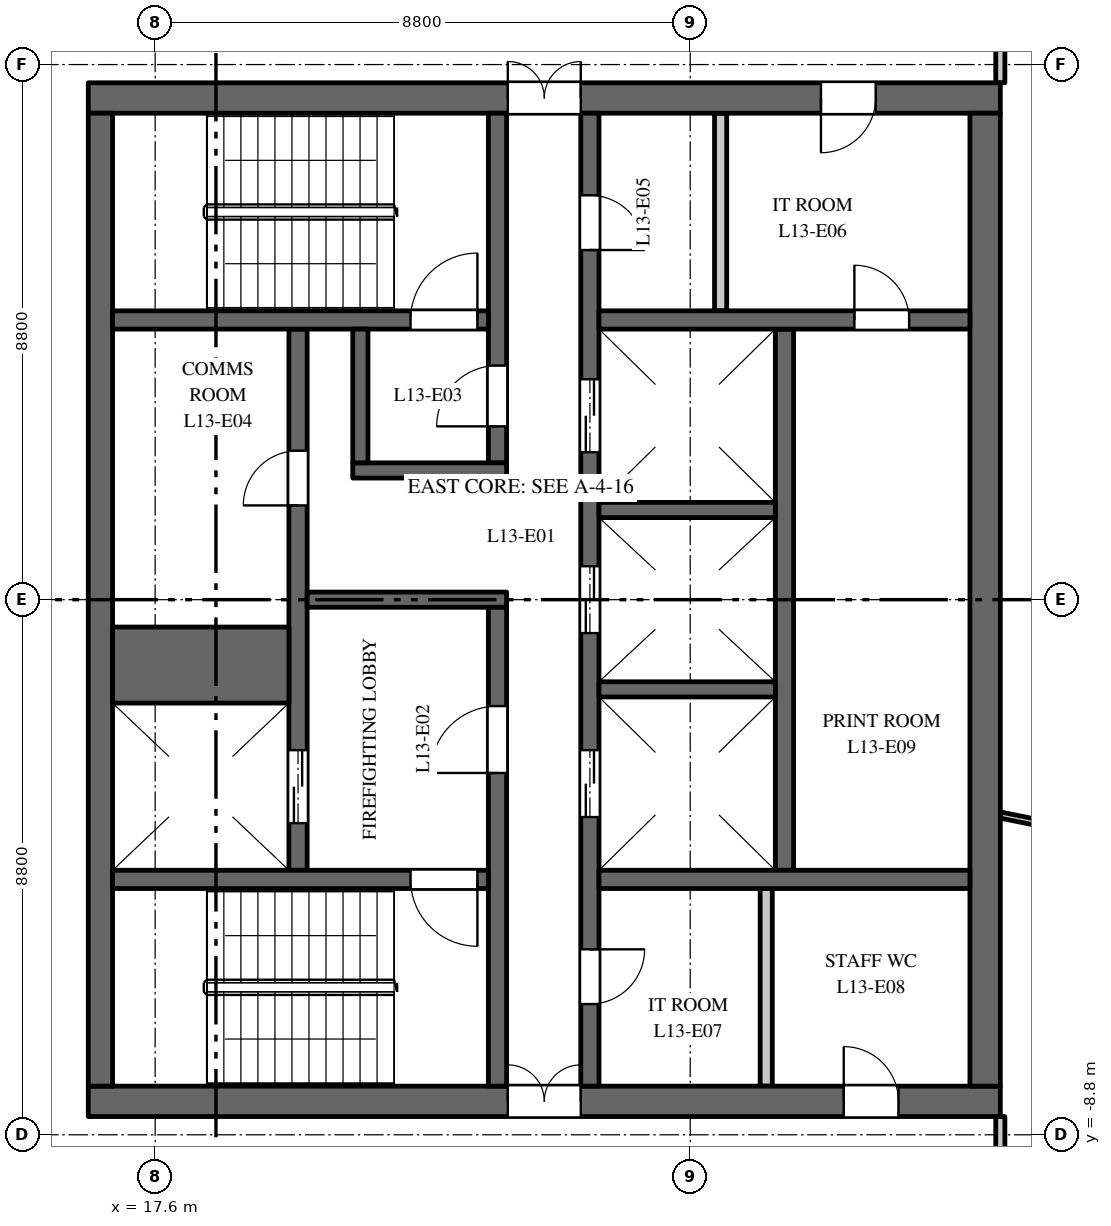
"""IFC4 building model, lengths in metres.
Left out: names, types, materials, properties, quantities, classifications, styles, units other than length and angle.
Written with IfcOpenShell. Run it as: python <this file> out.ifc"""

import sys

from ifc_helpers import new_model, si_unit, direction, frame, frame_2d, origin, place, context, subcontext, project, spatial, rectangle, extrude, element, fill, save


model = new_model("IFC4")
c1 = context("Model", 3, precision=1e-05, world=origin(), true_north=direction((0.0, 1.0)))
c2 = subcontext(c1, "Body", "Model", "MODEL_VIEW")
j1 = project(units=[si_unit("LENGTHUNIT", "METRE"), si_unit("PLANEANGLEUNIT", "RADIAN")], contexts=[c1])
p1 = place(None, origin())
s1 = spatial("IfcSite", under=j1, at=p1, CompositionType="ELEMENT")
p2 = place(p1, origin())
s2 = spatial("IfcBuilding", under=s1, at=p2, CompositionType="ELEMENT")
p3 = place(p2, frame((0.0, 0.0, 62.5)))
s3 = spatial("IfcBuildingStorey", under=s2, at=p3, CompositionType="ELEMENT", Elevation=62.5)
p4 = place(p3, frame((16.5, 8.25, 0.0), z_axis=(0.0, 0.0, 1.0), x_axis=(1.0, 0.0, 0.0)))
e1 = element("IfcWall", 1, at=p4, inside=s3, PredefinedType="SHEAR", context=c2, shape_type="SweptSolid", body=[
    extrude(rectangle(XDim=15.0, YDim=0.5, at=frame_2d((7.5, 0.0))), origin(), (0.0, 0.0, 1.0), 3.7),
])
p5 = place(p4, frame((6.9, 0.0, 0.0)))
e2 = element("IfcOpeningElement", 2, at=p5, cuts=e1, PredefinedType="OPENING", context=c2, shape_type="SweptSolid", body=[
    extrude(rectangle(XDim=1.2, YDim=2.1, at=frame_2d((0.6, 1.05))), frame((0.0, 0.26, 0.0), z_axis=(0.0, -1.0, 0.0), x_axis=(1.0, 0.0, 0.0)), (0.0, 0.0, 1.0), 0.52),
])
p6 = place(p4, frame((12.05, 0.0, 0.0)))
e3 = element("IfcOpeningElement", 3, at=p6, cuts=e1, PredefinedType="OPENING", context=c2, shape_type="SweptSolid", body=[
    extrude(rectangle(XDim=0.9, YDim=2.1, at=frame_2d((0.45, 1.05))), frame((0.0, 0.26, 0.0), z_axis=(0.0, -1.0, 0.0), x_axis=(1.0, 0.0, 0.0)), (0.0, 0.0, 1.0), 0.52),
])
p7 = place(p3, frame((16.5, -8.25, 0.0), z_axis=(0.0, 0.0, 1.0), x_axis=(1.0, 0.0, 0.0)))
e4 = element("IfcWall", 4, at=p7, inside=s3, PredefinedType="SHEAR", context=c2, shape_type="SweptSolid", body=[
    extrude(rectangle(XDim=15.0, YDim=0.5, at=frame_2d((7.5, 0.0))), origin(), (0.0, 0.0, 1.0), 3.7),
])
p8 = place(p7, frame((6.9, 0.0, 0.0)))
e5 = element("IfcOpeningElement", 5, at=p8, cuts=e4, PredefinedType="OPENING", context=c2, shape_type="SweptSolid", body=[
    extrude(rectangle(XDim=1.2, YDim=2.1, at=frame_2d((0.6, 1.05))), frame((0.0, 0.26, 0.0), z_axis=(0.0, -1.0, 0.0), x_axis=(1.0, 0.0, 0.0)), (0.0, 0.0, 1.0), 0.52),
])
p9 = place(p7, frame((12.425, 0.0, 0.0)))
e6 = element("IfcOpeningElement", 6, at=p9, cuts=e4, PredefinedType="OPENING", context=c2, shape_type="SweptSolid", body=[
    extrude(rectangle(XDim=0.9, YDim=2.1, at=frame_2d((0.45, 1.05))), frame((0.0, 0.26, 0.0), z_axis=(0.0, -1.0, 0.0), x_axis=(1.0, 0.0, 0.0)), (0.0, 0.0, 1.0), 0.52),
])
p10 = place(p3, frame((27.95, -4.45, 0.0), z_axis=(0.0, 0.0, 1.0), x_axis=(0.0, 1.0, 0.0)))
e7 = element("IfcWall", 7, at=p10, inside=s3, PredefinedType="SHEAR", context=c2, shape_type="SweptSolid", body=[
    extrude(rectangle(XDim=8.9, YDim=0.3, at=frame_2d((4.45, 0.0))), origin(), (0.0, 0.0, 1.0), 3.7),
])
p11 = place(p3, frame((19.95, -4.45, 0.0), z_axis=(0.0, 0.0, 1.0), x_axis=(0.0, 1.0, 0.0)))
e8 = element("IfcWall", 8, at=p11, inside=s3, PredefinedType="SHEAR", context=c2, shape_type="SweptSolid", body=[
    extrude(rectangle(XDim=8.9, YDim=0.3, at=frame_2d((4.45, 0.0))), origin(), (0.0, 0.0, 1.0), 3.7),
])
p12 = place(p11, frame((0.775, 0.0, 0.0)))
e9 = element("IfcOpeningElement", 9, at=p12, cuts=e8, PredefinedType="OPENING", context=c2, shape_type="SweptSolid", body=[
    extrude(rectangle(XDim=1.2, YDim=2.1, at=frame_2d((0.6, 1.05))), frame((0.0, 0.16, 0.0), z_axis=(0.0, -1.0, 0.0), x_axis=(1.0, 0.0, 0.0)), (0.0, 0.0, 1.0), 0.32),
])
p13 = place(p11, frame((6.0, 0.0, 0.0)))
e10 = element("IfcOpeningElement", 10, at=p13, cuts=e8, PredefinedType="OPENING", context=c2, shape_type="SweptSolid", body=[
    extrude(rectangle(XDim=0.9, YDim=2.1, at=frame_2d((0.45, 1.05))), frame((0.0, 0.16, 0.0), z_axis=(0.0, -1.0, 0.0), x_axis=(1.0, 0.0, 0.0)), (0.0, 0.0, 1.0), 0.32),
])
p14 = place(p3, frame((24.75, -8.0, 0.0), z_axis=(0.0, 0.0, 1.0), x_axis=(0.0, 1.0, 0.0)))
e11 = element("IfcWall", 11, at=p14, inside=s3, PredefinedType="SHEAR", context=c2, shape_type="SweptSolid", body=[
    extrude(rectangle(XDim=16.0, YDim=0.3, at=frame_2d((8.0, 0.0))), origin(), (0.0, 0.0, 1.0), 3.7),
])
p15 = place(p14, frame((4.425, 0.0, 0.0)))
e12 = element("IfcOpeningElement", 12, at=p15, cuts=e11, PredefinedType="OPENING", context=c2, shape_type="SweptSolid", body=[
    extrude(rectangle(XDim=1.1, YDim=2.1, at=frame_2d((0.55, 1.05))), frame((0.0, 0.16, 0.0), z_axis=(0.0, -1.0, 0.0), x_axis=(1.0, 0.0, 0.0)), (0.0, 0.0, 1.0), 0.32),
])
p16 = place(p14, frame((7.45, 0.0, 0.0)))
e13 = element("IfcOpeningElement", 13, at=p16, cuts=e11, PredefinedType="OPENING", context=c2, shape_type="SweptSolid", body=[
    extrude(rectangle(XDim=1.1, YDim=2.1, at=frame_2d((0.55, 1.05))), frame((0.0, 0.16, 0.0), z_axis=(0.0, -1.0, 0.0), x_axis=(1.0, 0.0, 0.0)), (0.0, 0.0, 1.0), 0.32),
])
p17 = place(p14, frame((10.425, 0.0, 0.0)))
e14 = element("IfcOpeningElement", 14, at=p17, cuts=e11, PredefinedType="OPENING", context=c2, shape_type="SweptSolid", body=[
    extrude(rectangle(XDim=1.2, YDim=2.1, at=frame_2d((0.6, 1.05))), frame((0.0, 0.16, 0.0), z_axis=(0.0, -1.0, 0.0), x_axis=(1.0, 0.0, 0.0)), (0.0, 0.0, 1.0), 0.32),
])
p18 = place(p14, frame((13.75, 0.0, 0.0)))
e15 = element("IfcOpeningElement", 15, at=p18, cuts=e11, PredefinedType="OPENING", context=c2, shape_type="SweptSolid", body=[
    extrude(rectangle(XDim=0.9, YDim=2.1, at=frame_2d((0.45, 1.05))), frame((0.0, 0.16, 0.0), z_axis=(0.0, -1.0, 0.0), x_axis=(1.0, 0.0, 0.0)), (0.0, 0.0, 1.0), 0.32),
])
p19 = place(p14, frame((1.35, 0.0, 0.0)))
e16 = element("IfcOpeningElement", 16, at=p19, cuts=e11, PredefinedType="OPENING", context=c2, shape_type="SweptSolid", body=[
    extrude(rectangle(XDim=0.9, YDim=2.1, at=frame_2d((0.45, 1.05))), frame((0.0, 0.16, 0.0), z_axis=(0.0, -1.0, 0.0), x_axis=(1.0, 0.0, 0.0)), (0.0, 0.0, 1.0), 0.32),
])
p20 = place(p3, frame((20.1, 0.0, 0.0), z_axis=(0.0, 0.0, 1.0), x_axis=(1.0, 0.0, 0.0)))
e17 = element("IfcWall", 17, at=p20, inside=s3, PredefinedType="SHEAR", context=c2, shape_type="SweptSolid", body=[
    extrude(rectangle(XDim=3.28, YDim=0.25, at=frame_2d((1.64, 0.0))), origin(), (0.0, 0.0, 1.0), 3.7),
])
p21 = place(p3, frame((16.7, -8.0, 0.0), z_axis=(0.0, 0.0, 1.0), x_axis=(0.0, 1.0, 0.0)))
e18 = element("IfcWall", 18, at=p21, inside=s3, PredefinedType="SHEAR", context=c2, shape_type="SweptSolid", body=[
    extrude(rectangle(XDim=16.0, YDim=0.4, at=frame_2d((8.0, 0.0))), origin(), (0.0, 0.0, 1.0), 3.7),
])
p22 = place(p3, frame((31.25, -8.0, 0.0), z_axis=(0.0, 0.0, 1.0), x_axis=(0.0, 1.0, 0.0)))
e19 = element("IfcWall", 19, at=p22, inside=s3, PredefinedType="SHEAR", context=c2, shape_type="SweptSolid", body=[
    extrude(rectangle(XDim=16.0, YDim=0.5, at=frame_2d((8.0, 0.0))), origin(), (0.0, 0.0, 1.0), 3.7),
])
p23 = place(p3, frame((24.9, 4.6, 0.0), z_axis=(0.0, 0.0, 1.0), x_axis=(1.0, 0.0, 0.0)))
e20 = element("IfcWall", 20, at=p23, inside=s3, PredefinedType="SHEAR", context=c2, shape_type="SweptSolid", body=[
    extrude(rectangle(XDim=6.1, YDim=0.3, at=frame_2d((3.05, 0.0))), origin(), (0.0, 0.0, 1.0), 3.7),
])
p24 = place(p23, frame((4.2, 0.0, 0.0)))
e21 = element("IfcOpeningElement", 21, at=p24, cuts=e20, PredefinedType="OPENING", context=c2, shape_type="SweptSolid", body=[
    extrude(rectangle(XDim=0.9, YDim=2.1, at=frame_2d((0.45, 1.05))), frame((0.0, 0.16, 0.0), z_axis=(0.0, -1.0, 0.0), x_axis=(1.0, 0.0, 0.0)), (0.0, 0.0, 1.0), 0.32),
])
for number, where, z_axis, x_axis in (
    (22, (26.9, 4.75, 0.0), (0.0, 0.0, 1.0), (0.0, 1.0, 0.0)),
    (23, (27.65, -8.0, 0.0), (0.0, 0.0, 1.0), (0.0, 1.0, 0.0)),
):
    element("IfcWall", number, at=place(p3, frame(where, z_axis=z_axis, x_axis=x_axis)), inside=s3, PredefinedType="PARTITIONING", context=c2, shape_type="SweptSolid", body=[
        extrude(rectangle(XDim=3.25, YDim=0.2, at=frame_2d((1.625, 0.0))), origin(), (0.0, 0.0, 1.0), 3.7),
    ])
p25 = place(p3, frame((24.9, -4.6, 0.0), z_axis=(0.0, 0.0, 1.0), x_axis=(1.0, 0.0, 0.0)))
e24 = element("IfcWall", 24, at=p25, inside=s3, PredefinedType="SHEAR", context=c2, shape_type="SweptSolid", body=[
    extrude(rectangle(XDim=6.1, YDim=0.3, at=frame_2d((3.05, 0.0))), origin(), (0.0, 0.0, 1.0), 3.7),
])
p26 = place(p3, frame((16.9, -1.075, 0.0), z_axis=(0.0, 0.0, 1.0), x_axis=(1.0, 0.0, 0.0)))
e25 = element("IfcWall", 25, at=p26, inside=s3, PredefinedType="SHEAR", context=c2, shape_type="SweptSolid", body=[
    extrude(rectangle(XDim=2.9, YDim=1.25, at=frame_2d((1.45, 0.0))), origin(), (0.0, 0.0, 1.0), 3.7),
])
for number, where, z_axis, x_axis in (
    (26, (24.9, -1.475, 0.0), (0.0, 0.0, 1.0), (1.0, 0.0, 0.0)),
    (27, (24.9, 1.475, 0.0), (0.0, 0.0, 1.0), (1.0, 0.0, 0.0)),
):
    element("IfcWall", number, at=place(p3, frame(where, z_axis=z_axis, x_axis=x_axis)), inside=s3, PredefinedType="SHEAR", context=c2, shape_type="SweptSolid", body=[
        extrude(rectangle(XDim=2.9, YDim=0.25, at=frame_2d((1.45, 0.0))), origin(), (0.0, 0.0, 1.0), 3.7),
    ])
p27 = place(p3, frame((23.23, 2.25, 0.0), z_axis=(0.0, 0.0, 1.0), x_axis=(0.0, 1.0, 0.0)))
e28 = element("IfcWall", 28, at=p27, inside=s3, PredefinedType="SHEAR", context=c2, shape_type="SweptSolid", body=[
    extrude(rectangle(XDim=5.75, YDim=0.3, at=frame_2d((2.875, 0.0))), origin(), (0.0, 0.0, 1.0), 3.7),
])
p28 = place(p27, frame((0.6, 0.0, 0.0)))
e29 = element("IfcOpeningElement", 29, at=p28, cuts=e28, PredefinedType="OPENING", context=c2, shape_type="SweptSolid", body=[
    extrude(rectangle(XDim=1.0, YDim=2.1, at=frame_2d((0.5, 1.05))), frame((0.0, 0.16, 0.0), z_axis=(0.0, -1.0, 0.0), x_axis=(1.0, 0.0, 0.0)), (0.0, 0.0, 1.0), 0.32),
])
p29 = place(p3, frame((23.23, -8.0, 0.0), z_axis=(0.0, 0.0, 1.0), x_axis=(0.0, 1.0, 0.0)))
e30 = element("IfcWall", 30, at=p29, inside=s3, PredefinedType="SHEAR", context=c2, shape_type="SweptSolid", body=[
    extrude(rectangle(XDim=7.875, YDim=0.3, at=frame_2d((3.938, 0.0))), origin(), (0.0, 0.0, 1.0), 3.7),
])
p30 = place(p29, frame((5.15, 0.0, 0.0)))
e31 = element("IfcOpeningElement", 31, at=p30, cuts=e30, PredefinedType="OPENING", context=c2, shape_type="SweptSolid", body=[
    extrude(rectangle(XDim=1.1, YDim=2.1, at=frame_2d((0.55, 1.05))), frame((0.0, 0.16, 0.0), z_axis=(0.0, -1.0, 0.0), x_axis=(1.0, 0.0, 0.0)), (0.0, 0.0, 1.0), 0.32),
])
p31 = place(p3, frame((16.9, 4.6, 0.0), z_axis=(0.0, 0.0, 1.0), x_axis=(1.0, 0.0, 0.0)))
e32 = element("IfcWall", 32, at=p31, inside=s3, PredefinedType="SHEAR", context=c2, shape_type="SweptSolid", body=[
    extrude(rectangle(XDim=6.18, YDim=0.3, at=frame_2d((3.09, 0.0))), origin(), (0.0, 0.0, 1.0), 3.7),
])
p32 = place(p31, frame((4.9, 0.0, 0.0)))
e33 = element("IfcOpeningElement", 33, at=p32, cuts=e32, PredefinedType="OPENING", context=c2, shape_type="SweptSolid", body=[
    extrude(rectangle(XDim=1.1, YDim=2.1, at=frame_2d((0.55, 1.05))), frame((0.0, 0.16, 0.0), z_axis=(0.0, -1.0, 0.0), x_axis=(1.0, 0.0, 0.0)), (0.0, 0.0, 1.0), 0.32),
])
p33 = place(p3, frame((16.9, -4.6, 0.0), z_axis=(0.0, 0.0, 1.0), x_axis=(1.0, 0.0, 0.0)))
e34 = element("IfcWall", 34, at=p33, inside=s3, PredefinedType="SHEAR", context=c2, shape_type="SweptSolid", body=[
    extrude(rectangle(XDim=6.18, YDim=0.3, at=frame_2d((3.09, 0.0))), origin(), (0.0, 0.0, 1.0), 3.7),
])
p34 = place(p33, frame((4.9, 0.0, 0.0)))
e35 = element("IfcOpeningElement", 35, at=p34, cuts=e34, PredefinedType="OPENING", context=c2, shape_type="SweptSolid", body=[
    extrude(rectangle(XDim=1.1, YDim=2.1, at=frame_2d((0.55, 1.05))), frame((0.0, 0.16, 0.0), z_axis=(0.0, -1.0, 0.0), x_axis=(1.0, 0.0, 0.0)), (0.0, 0.0, 1.0), 0.32),
])
p35 = place(p3, frame((20.85, 2.125, 0.0), z_axis=(0.0, 0.0, 1.0), x_axis=(1.0, 0.0, 0.0)))
e36 = element("IfcWall", 36, at=p35, inside=s3, PredefinedType="SHEAR", context=c2, shape_type="SweptSolid", body=[
    extrude(rectangle(XDim=2.53, YDim=0.25, at=frame_2d((1.265, 0.0))), origin(), (0.0, 0.0, 1.0), 3.7),
])
p36 = place(p3, frame((20.975, 2.25, 0.0), z_axis=(0.0, 0.0, 1.0), x_axis=(0.0, 1.0, 0.0)))
e37 = element("IfcWall", 37, at=p36, inside=s3, PredefinedType="SHEAR", context=c2, shape_type="SweptSolid", body=[
    extrude(rectangle(XDim=2.2, YDim=0.25, at=frame_2d((1.1, 0.0))), origin(), (0.0, 0.0, 1.0), 3.7),
])
p37 = place(p3, frame((31.5, -10.7, 0.0), z_axis=(0.0, 0.0, 1.0), x_axis=(0.0, 1.0, 0.0)))
e38 = element("IfcWall", 38, at=p37, inside=s3, PredefinedType="PARTITIONING", context=c2, shape_type="SweptSolid", body=[
    extrude(rectangle(XDim=2.2, YDim=0.15, at=frame_2d((1.1, 0.0))), origin(), (0.0, 0.0, 1.0), 2.85),
])
p38 = place(p3, frame((31.5, -3.542, 0.0), z_axis=(0.0, 0.0, 1.0), x_axis=(0.980357474535, -0.197228857227, 0.0)))
e39 = element("IfcWall", 39, at=p38, inside=s3, PredefinedType="PARTITIONING", context=c2, shape_type="SweptSolid", body=[
    extrude(rectangle(XDim=4.092, YDim=0.1, at=frame_2d((2.046, 0.0))), origin(), (0.0, 0.0, 1.0), 2.85),
])
p39 = place(p3, frame((31.5, 8.5, 0.0), z_axis=(0.0, 0.0, 1.0), x_axis=(0.0, 1.0, 0.0)))
e40 = element("IfcWall", 40, at=p39, inside=s3, PredefinedType="PARTITIONING", context=c2, shape_type="SweptSolid", body=[
    extrude(rectangle(XDim=2.2, YDim=0.15, at=frame_2d((1.1, 0.0))), origin(), (0.0, 0.0, 1.0), 2.85),
])
p40 = place(p39, frame((0.65, 0.0, 0.0)))
e41 = element("IfcOpeningElement", 41, at=p40, cuts=e40, PredefinedType="OPENING", context=c2, shape_type="SweptSolid", body=[
    extrude(rectangle(XDim=1.0, YDim=2.1, at=frame_2d((0.5, 1.05))), frame((0.0, 0.085, 0.0), z_axis=(0.0, -1.0, 0.0), x_axis=(1.0, 0.0, 0.0)), (0.0, 0.0, 1.0), 0.17),
])
p41 = place(p12, origin())
e42 = element("IfcDoor", 42, at=p41, inside=s3, OperationType="DOUBLE_DOOR_SLIDING", PredefinedType="DOOR", context=c2, shape_type="SweptSolid", body=[
    extrude(rectangle(XDim=1.2, YDim=2.1, at=frame_2d((0.6, 1.05))), frame((0.0, 0.025, 0.0), z_axis=(0.0, -1.0, 0.0), x_axis=(1.0, 0.0, 0.0)), (0.0, 0.0, 1.0), 0.05),
])
fill(e9, e42)
p42 = place(p15, origin())
e43 = element("IfcDoor", 43, at=p42, inside=s3, OperationType="DOUBLE_DOOR_SLIDING", PredefinedType="DOOR", context=c2, shape_type="SweptSolid", body=[
    extrude(rectangle(XDim=1.1, YDim=2.1, at=frame_2d((0.55, 1.05))), frame((0.0, 0.025, 0.0), z_axis=(0.0, -1.0, 0.0), x_axis=(1.0, 0.0, 0.0)), (0.0, 0.0, 1.0), 0.05),
])
fill(e12, e43)
p43 = place(p16, origin())
e44 = element("IfcDoor", 44, at=p43, inside=s3, OperationType="DOUBLE_DOOR_SLIDING", PredefinedType="DOOR", context=c2, shape_type="SweptSolid", body=[
    extrude(rectangle(XDim=1.1, YDim=2.1, at=frame_2d((0.55, 1.05))), frame((0.0, 0.025, 0.0), z_axis=(0.0, -1.0, 0.0), x_axis=(1.0, 0.0, 0.0)), (0.0, 0.0, 1.0), 0.05),
])
fill(e13, e44)
p44 = place(p17, origin())
e45 = element("IfcDoor", 45, at=p44, inside=s3, OperationType="DOUBLE_DOOR_SLIDING", PredefinedType="DOOR", context=c2, shape_type="SweptSolid", body=[
    extrude(rectangle(XDim=1.2, YDim=2.1, at=frame_2d((0.6, 1.05))), frame((0.0, 0.025, 0.0), z_axis=(0.0, -1.0, 0.0), x_axis=(1.0, 0.0, 0.0)), (0.0, 0.0, 1.0), 0.05),
])
fill(e14, e45)
p45 = place(p32, origin())
e46 = element("IfcDoor", 46, at=p45, inside=s3, OperationType="SINGLE_SWING_LEFT", PredefinedType="DOOR", context=c2, shape_type="SweptSolid", body=[
    extrude(rectangle(XDim=1.1, YDim=2.1, at=frame_2d((0.55, 1.05))), frame((0.0, 0.025, 0.0), z_axis=(0.0, -1.0, 0.0), x_axis=(1.0, 0.0, 0.0)), (0.0, 0.0, 1.0), 0.05),
])
fill(e33, e46)
p46 = place(p34, origin())
e47 = element("IfcDoor", 47, at=p46, inside=s3, OperationType="SINGLE_SWING_RIGHT", PredefinedType="DOOR", context=c2, shape_type="SweptSolid", body=[
    extrude(rectangle(XDim=1.1, YDim=2.1, at=frame_2d((0.55, 1.05))), frame((0.0, 0.025, 0.0), z_axis=(0.0, -1.0, 0.0), x_axis=(1.0, 0.0, 0.0)), (0.0, 0.0, 1.0), 0.05),
])
fill(e35, e47)
p47 = place(p30, origin())
e48 = element("IfcDoor", 48, at=p47, inside=s3, OperationType="SINGLE_SWING_RIGHT", PredefinedType="DOOR", context=c2, shape_type="SweptSolid", body=[
    extrude(rectangle(XDim=1.1, YDim=2.1, at=frame_2d((0.55, 1.05))), frame((0.0, 0.025, 0.0), z_axis=(0.0, -1.0, 0.0), x_axis=(1.0, 0.0, 0.0)), (0.0, 0.0, 1.0), 0.05),
])
fill(e31, e48)
p48 = place(p28, origin())
e49 = element("IfcDoor", 49, at=p48, inside=s3, OperationType="SINGLE_SWING_RIGHT", PredefinedType="DOOR", context=c2, shape_type="SweptSolid", body=[
    extrude(rectangle(XDim=1.0, YDim=2.1, at=frame_2d((0.5, 1.05))), frame((0.0, 0.025, 0.0), z_axis=(0.0, -1.0, 0.0), x_axis=(1.0, 0.0, 0.0)), (0.0, 0.0, 1.0), 0.05),
])
fill(e29, e49)
p49 = place(p5, origin())
e50 = element("IfcDoor", 50, at=p49, inside=s3, OperationType="DOUBLE_DOOR_DOUBLE_SWING", PredefinedType="DOOR", context=c2, shape_type="SweptSolid", body=[
    extrude(rectangle(XDim=1.2, YDim=2.1, at=frame_2d((0.6, 1.05))), frame((0.0, 0.025, 0.0), z_axis=(0.0, -1.0, 0.0), x_axis=(1.0, 0.0, 0.0)), (0.0, 0.0, 1.0), 0.05),
])
fill(e2, e50)
p50 = place(p8, origin())
e51 = element("IfcDoor", 51, at=p50, inside=s3, OperationType="DOUBLE_DOOR_DOUBLE_SWING", PredefinedType="DOOR", context=c2, shape_type="SweptSolid", body=[
    extrude(rectangle(XDim=1.2, YDim=2.1, at=frame_2d((0.6, 1.05))), frame((0.0, 0.025, 0.0), z_axis=(0.0, -1.0, 0.0), x_axis=(1.0, 0.0, 0.0)), (0.0, 0.0, 1.0), 0.05),
])
fill(e5, e51)
p51 = place(p13, origin())
e52 = element("IfcDoor", 52, at=p51, inside=s3, OperationType="SINGLE_SWING_RIGHT", PredefinedType="DOOR", context=c2, shape_type="SweptSolid", body=[
    extrude(rectangle(XDim=0.9, YDim=2.1, at=frame_2d((0.45, 1.05))), frame((0.0, 0.025, 0.0), z_axis=(0.0, -1.0, 0.0), x_axis=(1.0, 0.0, 0.0)), (0.0, 0.0, 1.0), 0.05),
])
fill(e10, e52)
p52 = place(p18, origin())
e53 = element("IfcDoor", 53, at=p52, inside=s3, OperationType="SINGLE_SWING_LEFT", PredefinedType="DOOR", context=c2, shape_type="SweptSolid", body=[
    extrude(rectangle(XDim=0.9, YDim=2.1, at=frame_2d((0.45, 1.05))), frame((0.0, 0.025, 0.0), z_axis=(0.0, -1.0, 0.0), x_axis=(1.0, 0.0, 0.0)), (0.0, 0.0, 1.0), 0.05),
])
fill(e15, e53)
p53 = place(p6, origin())
e54 = element("IfcDoor", 54, at=p53, inside=s3, OperationType="SINGLE_SWING_LEFT", PredefinedType="DOOR", context=c2, shape_type="SweptSolid", body=[
    extrude(rectangle(XDim=0.9, YDim=2.1, at=frame_2d((0.45, 1.05))), frame((0.0, 0.025, 0.0), z_axis=(0.0, -1.0, 0.0), x_axis=(1.0, 0.0, 0.0)), (0.0, 0.0, 1.0), 0.05),
])
fill(e3, e54)
p54 = place(p19, origin())
e55 = element("IfcDoor", 55, at=p54, inside=s3, OperationType="SINGLE_SWING_RIGHT", PredefinedType="DOOR", context=c2, shape_type="SweptSolid", body=[
    extrude(rectangle(XDim=0.9, YDim=2.1, at=frame_2d((0.45, 1.05))), frame((0.0, 0.025, 0.0), z_axis=(0.0, -1.0, 0.0), x_axis=(1.0, 0.0, 0.0)), (0.0, 0.0, 1.0), 0.05),
])
fill(e16, e55)
p55 = place(p9, origin())
e56 = element("IfcDoor", 56, at=p55, inside=s3, OperationType="SINGLE_SWING_RIGHT", PredefinedType="DOOR", context=c2, shape_type="SweptSolid", body=[
    extrude(rectangle(XDim=0.9, YDim=2.1, at=frame_2d((0.45, 1.05))), frame((0.0, 0.025, 0.0), z_axis=(0.0, -1.0, 0.0), x_axis=(1.0, 0.0, 0.0)), (0.0, 0.0, 1.0), 0.05),
])
fill(e6, e56)
p56 = place(p24, origin())
e57 = element("IfcDoor", 57, at=p56, inside=s3, OperationType="SINGLE_SWING_RIGHT", PredefinedType="DOOR", context=c2, shape_type="SweptSolid", body=[
    extrude(rectangle(XDim=0.9, YDim=2.1, at=frame_2d((0.45, 1.05))), frame((0.0, 0.025, 0.0), z_axis=(0.0, -1.0, 0.0), x_axis=(1.0, 0.0, 0.0)), (0.0, 0.0, 1.0), 0.05),
])
fill(e21, e57)
save(model, sys.argv[1])
